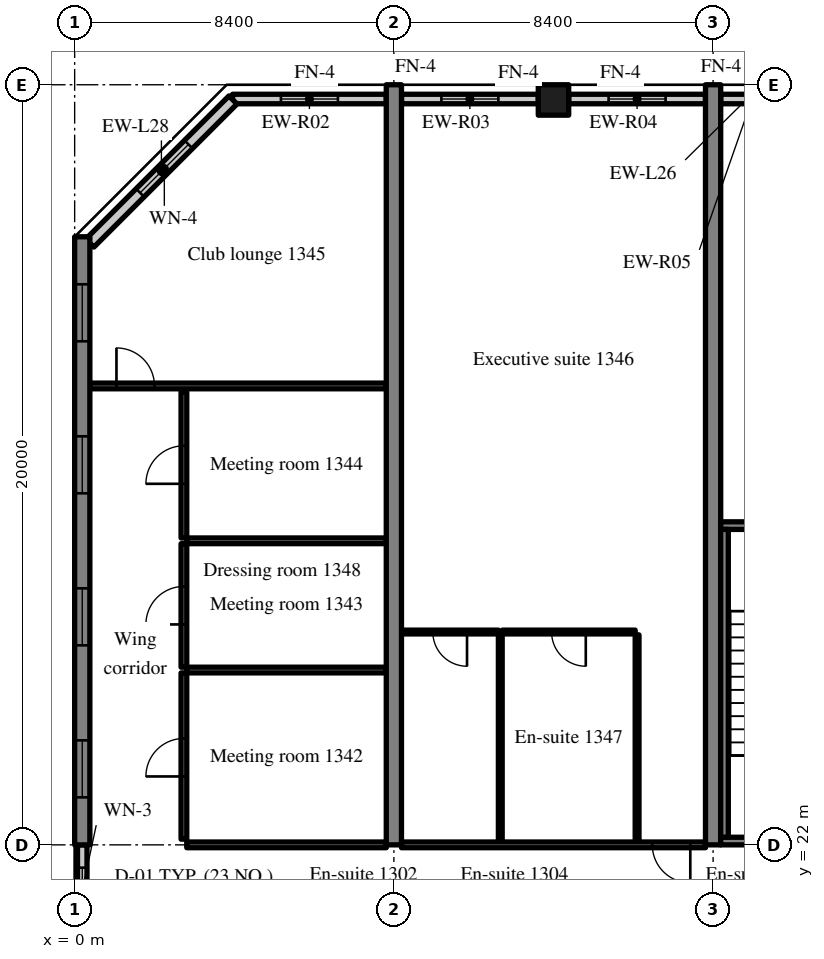
"""IFC4 building model, lengths in metres.
Left out: names, types, materials, properties, quantities, classifications, styles, units other than length and angle.
Written with IfcOpenShell. Run it as: python <this file> out.ifc"""

import sys

from ifc_helpers import new_model, si_unit, direction, frame, frame_2d, origin, origin_2d, place, context, subcontext, project, spatial, rectangle, extrude, source, transform, mapped, element, fill, save


model = new_model("IFC4")
c1 = context("Model", 3, precision=1e-05, world=origin(), true_north=direction((0.0, 1.0)))
c2 = subcontext(c1, "Body", "Model", "MODEL_VIEW")
j1 = project(units=[si_unit("LENGTHUNIT", "METRE"), si_unit("PLANEANGLEUNIT", "RADIAN")], contexts=[c1])
p1 = place(None, origin())
s1 = spatial("IfcSite", under=j1, at=p1, CompositionType="ELEMENT")
p2 = place(p1, origin())
s2 = spatial("IfcBuilding", under=s1, at=p2, CompositionType="ELEMENT")
p3 = place(p2, frame((0.0, 0.0, 58.2)))
s3 = spatial("IfcBuildingStorey", under=s2, at=p3, CompositionType="ELEMENT", Elevation=58.2)
m1 = source(origin(), c2, "Body", "SweptSolid", [
    extrude(rectangle(XDim=16.0, YDim=0.4, at=frame_2d((8.0, 0.0))), origin(), (0.0, 0.0, 1.0), 3.52),
])
p4 = place(p3, frame((0.2, 22.0, 0.0), z_axis=(0.0, 0.0, 1.0), x_axis=(0.0, 1.0, 0.0)))
e1 = element("IfcWall", 1, at=p4, inside=s3, PredefinedType="SHEAR", context=c2, shape_type="MappedRepresentation", body=[
    mapped(m1, transform((0.0, 0.0, 0.0), scale=1.0)),
])
m2 = source(origin(), c2, "Body", "SweptSolid", [
    extrude(rectangle(XDim=1.5, YDim=1.5, at=frame_2d((0.75, 0.75))), frame((0.0, 0.21, 0.0), z_axis=(0.0, -1.0, 0.0), x_axis=(1.0, 0.0, 0.0)), (0.0, 0.0, 1.0), 0.42),
])
p5 = place(p4, frame((1.25, 0.0, 0.9)))
e2 = element("IfcOpeningElement", 2, at=p5, cuts=e1, PredefinedType="OPENING", context=c2, shape_type="MappedRepresentation", body=[
    mapped(m2, transform((0.0, 0.0, 0.0), scale=1.0)),
])
p6 = place(p4, frame((5.25, 0.0, 0.9)))
e3 = element("IfcOpeningElement", 3, at=p6, cuts=e1, PredefinedType="OPENING", context=c2, shape_type="MappedRepresentation", body=[
    mapped(m2, transform((0.0, 0.0, 0.0), scale=1.0)),
])
p7 = place(p4, frame((9.25, 0.0, 0.9)))
e4 = element("IfcOpeningElement", 4, at=p7, cuts=e1, PredefinedType="OPENING", context=c2, shape_type="MappedRepresentation", body=[
    mapped(m2, transform((0.0, 0.0, 0.0), scale=1.0)),
])
p8 = place(p4, frame((13.25, 0.0, 0.9)))
e5 = element("IfcOpeningElement", 5, at=p8, cuts=e1, PredefinedType="OPENING", context=c2, shape_type="MappedRepresentation", body=[
    mapped(m2, transform((0.0, 0.0, 0.0), scale=1.0)),
])
m3 = source(origin(), c2, "Body", "SweptSolid", [
    extrude(rectangle(XDim=20.0, YDim=0.4, at=frame_2d((10.0, 0.0))), origin(), (0.0, 0.0, 1.0), 3.52),
])
for number, where, z_axis, x_axis in (
    (6, (8.4, 22.0, 0.0), (0.0, 0.0, 1.0), (0.0, 1.0, 0.0)),
    (7, (16.8, 22.0, 0.0), (0.0, 0.0, 1.0), (0.0, 1.0, 0.0)),
):
    element("IfcWall", number, at=place(p3, frame(where, z_axis=z_axis, x_axis=x_axis)), inside=s3, PredefinedType="SHEAR", context=c2, shape_type="MappedRepresentation", body=[
        mapped(m3, transform((0.0, 0.0, 0.0), scale=1.0)),
    ])
m4 = source(origin(), c2, "Body", "SweptSolid", [
    extrude(rectangle(XDim=0.8, YDim=0.8, at=origin_2d()), origin(), (0.0, 0.0, 1.0), 3.52),
])
p9 = place(p3, frame((12.6, 41.6, 0.0), z_axis=(0.0, 0.0, 1.0), x_axis=(1.0, 0.0, 0.0)))
e8 = element("IfcColumn", 8, at=p9, inside=s3, PredefinedType="COLUMN", context=c2, shape_type="MappedRepresentation", body=[
    mapped(m4, transform((0.0, 0.0, 0.0), scale=1.0)),
])
m5 = source(origin(), c2, "Body", "SweptSolid", [
    extrude(rectangle(XDim=4.045, YDim=0.25, at=frame_2d((2.022, 0.0))), origin(), (0.0, 0.0, 1.0), 2.82),
])
p10 = place(p3, frame((8.2, 41.625, 0.0), z_axis=(0.0, 0.0, 1.0), x_axis=(-1.0, 0.0, 0.0)))
e9 = element("IfcWall", 9, at=p10, inside=s3, PredefinedType="SOLIDWALL", context=c2, shape_type="MappedRepresentation", body=[
    mapped(m5, transform((0.0, 0.0, 0.0), scale=1.0)),
])
m6 = source(origin(), c2, "Body", "SweptSolid", [
    extrude(rectangle(XDim=1.5, YDim=1.5, at=frame_2d((0.75, 0.75))), frame((0.0, 0.135, 0.0), z_axis=(0.0, -1.0, 0.0), x_axis=(1.0, 0.0, 0.0)), (0.0, 0.0, 1.0), 0.27),
])
p11 = place(p10, frame((1.272, 0.0, 0.9)))
e10 = element("IfcOpeningElement", 10, at=p11, cuts=e9, PredefinedType="OPENING", context=c2, shape_type="MappedRepresentation", body=[
    mapped(m6, transform((0.0, 0.0, 0.0), scale=1.0)),
])
m7 = source(origin(), c2, "Body", "SweptSolid", [
    extrude(rectangle(XDim=3.6, YDim=0.25, at=frame_2d((1.8, 0.0))), origin(), (0.0, 0.0, 1.0), 2.82),
])
p12 = place(p3, frame((12.2, 41.625, 0.0), z_axis=(0.0, 0.0, 1.0), x_axis=(-1.0, 0.0, 0.0)))
e11 = element("IfcWall", 11, at=p12, inside=s3, PredefinedType="SOLIDWALL", context=c2, shape_type="MappedRepresentation", body=[
    mapped(m7, transform((0.0, 0.0, 0.0), scale=1.0)),
])
p13 = place(p12, frame((1.05, 0.0, 0.9)))
e12 = element("IfcOpeningElement", 12, at=p13, cuts=e11, PredefinedType="OPENING", context=c2, shape_type="MappedRepresentation", body=[
    mapped(m6, transform((0.0, 0.0, 0.0), scale=1.0)),
])
m8 = source(origin(), c2, "Body", "SweptSolid", [
    extrude(rectangle(XDim=3.6, YDim=0.25, at=frame_2d((1.8, 0.0))), origin(), (0.0, 0.0, 1.0), 2.82),
])
p14 = place(p3, frame((16.6, 41.625, 0.0), z_axis=(0.0, 0.0, 1.0), x_axis=(-1.0, 0.0, 0.0)))
e13 = element("IfcWall", 13, at=p14, inside=s3, PredefinedType="SOLIDWALL", context=c2, shape_type="MappedRepresentation", body=[
    mapped(m8, transform((0.0, 0.0, 0.0), scale=1.0)),
])
p15 = place(p14, frame((1.05, 0.0, 0.9)))
e14 = element("IfcOpeningElement", 14, at=p15, cuts=e13, PredefinedType="OPENING", context=c2, shape_type="MappedRepresentation", body=[
    mapped(m6, transform((0.0, 0.0, 0.0), scale=1.0)),
])
m9 = source(origin(), c2, "Body", "SweptSolid", [
    extrude(rectangle(XDim=1.658, YDim=0.25, at=frame_2d((0.829, 0.0))), origin(), (0.0, 0.0, 1.0), 2.82),
])
p16 = place(p3, frame((18.658, 41.625, 0.0), z_axis=(0.0, 0.0, 1.0), x_axis=(-1.0, 0.0, 0.0)))
e15 = element("IfcWall", 15, at=p16, inside=s3, PredefinedType="SOLIDWALL", context=c2, shape_type="MappedRepresentation", body=[
    mapped(m9, transform((0.0, 0.0, 0.0), scale=1.0)),
])
m10 = source(origin(), c2, "Body", "SweptSolid", [
    extrude(rectangle(XDim=5.326, YDim=0.3, at=frame_2d((2.663, 0.0))), origin(), (0.0, 0.0, 1.0), 3.52),
])
p17 = place(p3, frame((4.166, 41.6, 0.0), z_axis=(0.0, 0.0, 1.0), x_axis=(-0.707106781187, -0.707106781187, 0.0)))
e16 = element("IfcWall", 16, at=p17, inside=s3, PredefinedType="SOLIDWALL", context=c2, shape_type="MappedRepresentation", body=[
    mapped(m10, transform((0.0, 0.0, 0.0), scale=1.0)),
])
m11 = source(origin(), c2, "Body", "SweptSolid", [
    extrude(rectangle(XDim=1.8, YDim=1.5, at=frame_2d((0.9, 0.75))), frame((0.0, 0.16, 0.0), z_axis=(0.0, -1.0, 0.0), x_axis=(1.0, 0.0, 0.0)), (0.0, 0.0, 1.0), 0.32),
])
p18 = place(p17, frame((1.654, 0.0, 0.9)))
e17 = element("IfcOpeningElement", 17, at=p18, cuts=e16, PredefinedType="OPENING", context=c2, shape_type="MappedRepresentation", body=[
    mapped(m11, transform((0.0, 0.0, 0.0), scale=1.0)),
])
m12 = source(origin(), c2, "Body", "SweptSolid", [
    extrude(rectangle(XDim=2.4, YDim=0.25, at=frame_2d((1.2, 0.0))), origin(), (0.0, 0.0, 1.0), 2.62),
])
p19 = place(p3, frame((0.2, 19.6, 0.0), z_axis=(0.0, 0.0, 1.0), x_axis=(0.0, 1.0, 0.0)))
e18 = element("IfcWall", 18, at=p19, inside=s3, PredefinedType="SOLIDWALL", context=c2, shape_type="MappedRepresentation", body=[
    mapped(m12, transform((0.0, 0.0, 0.0), scale=1.0)),
])
m13 = source(origin(), c2, "Body", "SweptSolid", [
    extrude(rectangle(XDim=1.2, YDim=1.5, at=frame_2d((0.6, 0.75))), frame((0.0, 0.135, 0.0), z_axis=(0.0, -1.0, 0.0), x_axis=(1.0, 0.0, 0.0)), (0.0, 0.0, 1.0), 0.27),
])
p20 = place(p19, frame((0.6, 0.0, 0.9)))
e19 = element("IfcOpeningElement", 19, at=p20, cuts=e18, PredefinedType="OPENING", context=c2, shape_type="MappedRepresentation", body=[
    mapped(m13, transform((0.0, 0.0, 0.0), scale=1.0)),
])
m14 = source(origin(), c2, "Body", "SweptSolid", [
    extrude(rectangle(XDim=8.2, YDim=0.2, at=frame_2d((4.1, 0.0))), origin(), (0.0, 0.0, 1.0), 3.52),
])
p21 = place(p3, frame((17.0, 22.1, 0.0), z_axis=(0.0, 0.0, 1.0), x_axis=(1.0, 0.0, 0.0)))
e20 = element("IfcWall", 20, at=p21, inside=s3, PredefinedType="SOLIDWALL", context=c2, shape_type="MappedRepresentation", body=[
    mapped(m14, transform((0.0, 0.0, 0.0), scale=1.0)),
])
m15 = source(origin(), c2, "Body", "SweptSolid", [
    extrude(rectangle(XDim=1.2, YDim=2.1, at=frame_2d((0.6, 1.05))), frame((0.0, 0.11, 0.0), z_axis=(0.0, -1.0, 0.0), x_axis=(1.0, 0.0, 0.0)), (0.0, 0.0, 1.0), 0.22),
])
p22 = place(p21, frame((6.0, 0.0, 0.0)))
e21 = element("IfcOpeningElement", 21, at=p22, cuts=e20, PredefinedType="OPENING", context=c2, shape_type="MappedRepresentation", body=[
    mapped(m15, transform((0.0, 0.0, 0.0), scale=1.0)),
])
p23 = place(p3, frame((17.0, 30.4, 0.0), z_axis=(0.0, 0.0, 1.0), x_axis=(1.0, 0.0, 0.0)))
e22 = element("IfcWall", 22, at=p23, inside=s3, PredefinedType="SOLIDWALL", context=c2, shape_type="MappedRepresentation", body=[
    mapped(m14, transform((0.0, 0.0, 0.0), scale=1.0)),
])
m16 = source(origin(), c2, "Body", "SweptSolid", [
    extrude(rectangle(XDim=1.0, YDim=2.1, at=frame_2d((0.5, 1.05))), frame((0.0, 0.11, 0.0), z_axis=(0.0, -1.0, 0.0), x_axis=(1.0, 0.0, 0.0)), (0.0, 0.0, 1.0), 0.22),
])
p24 = place(p23, frame((6.1, 0.0, 0.0)))
e23 = element("IfcOpeningElement", 23, at=p24, cuts=e22, PredefinedType="OPENING", context=c2, shape_type="MappedRepresentation", body=[
    mapped(m16, transform((0.0, 0.0, 0.0), scale=1.0)),
])
m17 = source(origin(), c2, "Body", "SweptSolid", [
    extrude(rectangle(XDim=8.1, YDim=0.2, at=frame_2d((4.05, 0.0))), origin(), (0.0, 0.0, 1.0), 3.52),
])
p25 = place(p3, frame((17.1, 22.2, 0.0), z_axis=(0.0, 0.0, 1.0), x_axis=(0.0, 1.0, 0.0)))
e24 = element("IfcWall", 24, at=p25, inside=s3, PredefinedType="SOLIDWALL", context=c2, shape_type="MappedRepresentation", body=[
    mapped(m17, transform((0.0, 0.0, 0.0), scale=1.0)),
])
m18 = source(origin(), c2, "Body", "SweptSolid", [
    extrude(rectangle(XDim=5.25, YDim=0.15, at=frame_2d((2.625, 0.0))), origin(), (0.0, 0.0, 1.0), 2.82),
])
p26 = place(p3, frame((2.95, 22.0, 0.0), z_axis=(0.0, 0.0, 1.0), x_axis=(1.0, 0.0, 0.0)))
e25 = element("IfcWall", 25, at=p26, inside=s3, PredefinedType="PARTITIONING", context=c2, shape_type="MappedRepresentation", body=[
    mapped(m18, transform((0.0, 0.0, 0.0), scale=1.0)),
])
m19 = source(origin(), c2, "Body", "SweptSolid", [
    extrude(rectangle(XDim=4.375, YDim=0.15, at=frame_2d((2.188, 0.0))), origin(), (0.0, 0.0, 1.0), 3.52),
])
p27 = place(p3, frame((2.875, 22.15, 0.0), z_axis=(0.0, 0.0, 1.0), x_axis=(0.0, 1.0, 0.0)))
e26 = element("IfcWall", 26, at=p27, inside=s3, PredefinedType="PARTITIONING", context=c2, shape_type="MappedRepresentation", body=[
    mapped(m19, transform((0.0, 0.0, 0.0), scale=1.0)),
])
m20 = source(origin(), c2, "Body", "SweptSolid", [
    extrude(rectangle(XDim=1.0, YDim=2.1, at=frame_2d((0.5, 1.05))), frame((0.0, 0.085, 0.0), z_axis=(0.0, -1.0, 0.0), x_axis=(1.0, 0.0, 0.0)), (0.0, 0.0, 1.0), 0.17),
])
p28 = place(p27, frame((1.65, 0.0, 0.0)))
e27 = element("IfcOpeningElement", 27, at=p28, cuts=e26, PredefinedType="OPENING", context=c2, shape_type="MappedRepresentation", body=[
    mapped(m20, transform((0.0, 0.0, 0.0), scale=1.0)),
])
m21 = source(origin(), c2, "Body", "SweptSolid", [
    extrude(rectangle(XDim=5.25, YDim=0.15, at=frame_2d((2.625, 0.0))), origin(), (0.0, 0.0, 1.0), 3.52),
])
p29 = place(p3, frame((2.95, 26.6, 0.0), z_axis=(0.0, 0.0, 1.0), x_axis=(1.0, 0.0, 0.0)))
e28 = element("IfcWall", 28, at=p29, inside=s3, PredefinedType="PARTITIONING", context=c2, shape_type="MappedRepresentation", body=[
    mapped(m21, transform((0.0, 0.0, 0.0), scale=1.0)),
])
m22 = source(origin(), c2, "Body", "SweptSolid", [
    extrude(rectangle(XDim=3.25, YDim=0.15, at=frame_2d((1.625, 0.0))), origin(), (0.0, 0.0, 1.0), 3.52),
])
p30 = place(p3, frame((2.875, 26.675, 0.0), z_axis=(0.0, 0.0, 1.0), x_axis=(0.0, 1.0, 0.0)))
e29 = element("IfcWall", 29, at=p30, inside=s3, PredefinedType="PARTITIONING", context=c2, shape_type="MappedRepresentation", body=[
    mapped(m22, transform((0.0, 0.0, 0.0), scale=1.0)),
])
p31 = place(p30, frame((1.125, 0.0, 0.0)))
e30 = element("IfcOpeningElement", 30, at=p31, cuts=e29, PredefinedType="OPENING", context=c2, shape_type="MappedRepresentation", body=[
    mapped(m20, transform((0.0, 0.0, 0.0), scale=1.0)),
])
p32 = place(p3, frame((2.95, 30.0, 0.0), z_axis=(0.0, 0.0, 1.0), x_axis=(1.0, 0.0, 0.0)))
e31 = element("IfcWall", 31, at=p32, inside=s3, PredefinedType="PARTITIONING", context=c2, shape_type="MappedRepresentation", body=[
    mapped(m21, transform((0.0, 0.0, 0.0), scale=1.0)),
])
m23 = source(origin(), c2, "Body", "SweptSolid", [
    extrude(rectangle(XDim=3.85, YDim=0.15, at=frame_2d((1.925, 0.0))), origin(), (0.0, 0.0, 1.0), 3.52),
])
p33 = place(p3, frame((2.875, 30.075, 0.0), z_axis=(0.0, 0.0, 1.0), x_axis=(0.0, 1.0, 0.0)))
e32 = element("IfcWall", 32, at=p33, inside=s3, PredefinedType="PARTITIONING", context=c2, shape_type="MappedRepresentation", body=[
    mapped(m23, transform((0.0, 0.0, 0.0), scale=1.0)),
])
p34 = place(p33, frame((1.425, 0.0, 0.0)))
e33 = element("IfcOpeningElement", 33, at=p34, cuts=e32, PredefinedType="OPENING", context=c2, shape_type="MappedRepresentation", body=[
    mapped(m20, transform((0.0, 0.0, 0.0), scale=1.0)),
])
m24 = source(origin(), c2, "Body", "SweptSolid", [
    extrude(rectangle(XDim=7.8, YDim=0.15, at=frame_2d((3.9, 0.0))), origin(), (0.0, 0.0, 1.0), 3.52),
])
p35 = place(p3, frame((0.4, 34.075, 0.0), z_axis=(0.0, 0.0, 1.0), x_axis=(1.0, 0.0, 0.0)))
e34 = element("IfcWall", 34, at=p35, inside=s3, PredefinedType="PARTITIONING", context=c2, shape_type="MappedRepresentation", body=[
    mapped(m24, transform((0.0, 0.0, 0.0), scale=1.0)),
])
p36 = place(p35, frame((0.7, 0.0, 0.0)))
e35 = element("IfcOpeningElement", 35, at=p36, cuts=e34, PredefinedType="OPENING", context=c2, shape_type="MappedRepresentation", body=[
    mapped(m20, transform((0.0, 0.0, 0.0), scale=1.0)),
])
m25 = source(origin(), c2, "Body", "SweptSolid", [
    extrude(rectangle(XDim=5.45, YDim=0.1, at=frame_2d((2.725, 0.0))), origin(), (0.0, 0.0, 1.0), 3.52),
])
for number, where, z_axis, x_axis in (
    (36, (14.8, 22.075, 0.0), (0.0, 0.0, 1.0), (0.0, 1.0, 0.0)),
    (37, (11.2, 22.075, 0.0), (0.0, 0.0, 1.0), (0.0, 1.0, 0.0)),
):
    element("IfcWall", number, at=place(p3, frame(where, z_axis=z_axis, x_axis=x_axis)), inside=s3, PredefinedType="PARTITIONING", context=c2, shape_type="MappedRepresentation", body=[
        mapped(m25, transform((0.0, 0.0, 0.0), scale=1.0)),
    ])
m26 = source(origin(), c2, "Body", "SweptSolid", [
    extrude(rectangle(XDim=3.5, YDim=0.1, at=frame_2d((1.75, 0.0))), origin(), (0.0, 0.0, 1.0), 3.52),
])
p37 = place(p3, frame((11.25, 27.6, 0.0), z_axis=(0.0, 0.0, 1.0), x_axis=(1.0, 0.0, 0.0)))
e38 = element("IfcWall", 38, at=p37, inside=s3, PredefinedType="PARTITIONING", context=c2, shape_type="MappedRepresentation", body=[
    mapped(m26, transform((0.0, 0.0, 0.0), scale=1.0)),
])
m27 = source(origin(), c2, "Body", "SweptSolid", [
    extrude(rectangle(XDim=0.9, YDim=2.1, at=frame_2d((0.45, 1.05))), frame((0.0, 0.06, 0.0), z_axis=(0.0, -1.0, 0.0), x_axis=(1.0, 0.0, 0.0)), (0.0, 0.0, 1.0), 0.12),
])
p38 = place(p37, frame((1.3, 0.0, 0.0)))
e39 = element("IfcOpeningElement", 39, at=p38, cuts=e38, PredefinedType="OPENING", context=c2, shape_type="MappedRepresentation", body=[
    mapped(m27, transform((0.0, 0.0, 0.0), scale=1.0)),
])
m28 = source(origin(), c2, "Body", "SweptSolid", [
    extrude(rectangle(XDim=2.55, YDim=0.1, at=frame_2d((1.275, 0.0))), origin(), (0.0, 0.0, 1.0), 3.52),
])
p39 = place(p3, frame((8.6, 27.6, 0.0), z_axis=(0.0, 0.0, 1.0), x_axis=(1.0, 0.0, 0.0)))
e40 = element("IfcWall", 40, at=p39, inside=s3, PredefinedType="PARTITIONING", context=c2, shape_type="MappedRepresentation", body=[
    mapped(m28, transform((0.0, 0.0, 0.0), scale=1.0)),
])
p40 = place(p39, frame((0.825, 0.0, 0.0)))
e41 = element("IfcOpeningElement", 41, at=p40, cuts=e40, PredefinedType="OPENING", context=c2, shape_type="MappedRepresentation", body=[
    mapped(m27, transform((0.0, 0.0, 0.0), scale=1.0)),
])
m29 = source(origin(), c2, "Body", "SweptSolid", [
    extrude(rectangle(XDim=8.0, YDim=0.15, at=frame_2d((4.0, 0.0))), origin(), (0.0, 0.0, 1.0), 2.82),
])
p41 = place(p3, frame((8.6, 22.0, 0.0), z_axis=(0.0, 0.0, 1.0), x_axis=(1.0, 0.0, 0.0)))
e42 = element("IfcWall", 42, at=p41, inside=s3, PredefinedType="PARTITIONING", context=c2, shape_type="MappedRepresentation", body=[
    mapped(m29, transform((0.0, 0.0, 0.0), scale=1.0)),
])
p42 = place(p41, frame((6.6, 0.0, 0.0)))
e43 = element("IfcOpeningElement", 43, at=p42, cuts=e42, PredefinedType="OPENING", context=c2, shape_type="MappedRepresentation", body=[
    mapped(m20, transform((0.0, 0.0, 0.0), scale=1.0)),
])
m30 = source(origin(), c2, "Body", "SweptSolid", [
    extrude(rectangle(XDim=1.5, YDim=1.5, at=frame_2d((0.75, 0.75))), frame((0.0, 0.03, 0.0), z_axis=(0.0, -1.0, 0.0), x_axis=(1.0, 0.0, 0.0)), (0.0, 0.0, 1.0), 0.06),
])
p43 = place(p11, origin())
e44 = element("IfcWindow", 44, at=p43, inside=s3, PartitioningType="SINGLE_PANEL", PredefinedType="WINDOW", context=c2, shape_type="MappedRepresentation", body=[
    mapped(m30, transform((0.0, 0.0, 0.0), scale=1.0)),
])
fill(e10, e44)
p44 = place(p13, origin())
e45 = element("IfcWindow", 45, at=p44, inside=s3, PartitioningType="SINGLE_PANEL", PredefinedType="WINDOW", context=c2, shape_type="MappedRepresentation", body=[
    mapped(m30, transform((0.0, 0.0, 0.0), scale=1.0)),
])
fill(e12, e45)
p45 = place(p15, origin())
e46 = element("IfcWindow", 46, at=p45, inside=s3, PartitioningType="SINGLE_PANEL", PredefinedType="WINDOW", context=c2, shape_type="MappedRepresentation", body=[
    mapped(m30, transform((0.0, 0.0, 0.0), scale=1.0)),
])
fill(e14, e46)
m31 = source(origin(), c2, "Body", "SweptSolid", [
    extrude(rectangle(XDim=1.8, YDim=1.5, at=frame_2d((0.9, 0.75))), frame((0.0, 0.03, 0.0), z_axis=(0.0, -1.0, 0.0), x_axis=(1.0, 0.0, 0.0)), (0.0, 0.0, 1.0), 0.06),
])
p46 = place(p18, origin())
e47 = element("IfcWindow", 47, at=p46, inside=s3, PartitioningType="SINGLE_PANEL", PredefinedType="WINDOW", context=c2, shape_type="MappedRepresentation", body=[
    mapped(m31, transform((0.0, 0.0, 0.0), scale=1.0)),
])
fill(e17, e47)
p47 = place(p5, origin())
e48 = element("IfcWindow", 48, at=p47, inside=s3, PartitioningType="SINGLE_PANEL", PredefinedType="WINDOW", context=c2, shape_type="MappedRepresentation", body=[
    mapped(m30, transform((0.0, 0.0, 0.0), scale=1.0)),
])
fill(e2, e48)
p48 = place(p6, origin())
e49 = element("IfcWindow", 49, at=p48, inside=s3, PartitioningType="SINGLE_PANEL", PredefinedType="WINDOW", context=c2, shape_type="MappedRepresentation", body=[
    mapped(m30, transform((0.0, 0.0, 0.0), scale=1.0)),
])
fill(e3, e49)
p49 = place(p7, origin())
e50 = element("IfcWindow", 50, at=p49, inside=s3, PartitioningType="SINGLE_PANEL", PredefinedType="WINDOW", context=c2, shape_type="MappedRepresentation", body=[
    mapped(m30, transform((0.0, 0.0, 0.0), scale=1.0)),
])
fill(e4, e50)
p50 = place(p8, origin())
e51 = element("IfcWindow", 51, at=p50, inside=s3, PartitioningType="SINGLE_PANEL", PredefinedType="WINDOW", context=c2, shape_type="MappedRepresentation", body=[
    mapped(m30, transform((0.0, 0.0, 0.0), scale=1.0)),
])
fill(e5, e51)
m32 = source(origin(), c2, "Body", "SweptSolid", [
    extrude(rectangle(XDim=1.2, YDim=1.5, at=frame_2d((0.6, 0.75))), frame((0.0, 0.03, 0.0), z_axis=(0.0, -1.0, 0.0), x_axis=(1.0, 0.0, 0.0)), (0.0, 0.0, 1.0), 0.06),
])
p51 = place(p20, origin())
e52 = element("IfcWindow", 52, at=p51, inside=s3, PartitioningType="SINGLE_PANEL", PredefinedType="WINDOW", context=c2, shape_type="MappedRepresentation", body=[
    mapped(m32, transform((0.0, 0.0, 0.0), scale=1.0)),
])
fill(e19, e52)
m33 = source(origin(), c2, "Body", "SweptSolid", [
    extrude(rectangle(XDim=1.0, YDim=2.1, at=frame_2d((0.5, 1.05))), frame((0.0, 0.025, 0.0), z_axis=(0.0, -1.0, 0.0), x_axis=(1.0, 0.0, 0.0)), (0.0, 0.0, 1.0), 0.05),
])
p52 = place(p28, origin())
e53 = element("IfcDoor", 53, at=p52, inside=s3, OperationType="SINGLE_SWING_LEFT", PredefinedType="DOOR", context=c2, shape_type="MappedRepresentation", body=[
    mapped(m33, transform((0.0, 0.0, 0.0), scale=1.0)),
])
fill(e27, e53)
p53 = place(p31, origin())
e54 = element("IfcDoor", 54, at=p53, inside=s3, OperationType="SINGLE_SWING_LEFT", PredefinedType="DOOR", context=c2, shape_type="MappedRepresentation", body=[
    mapped(m33, transform((0.0, 0.0, 0.0), scale=1.0)),
])
fill(e30, e54)
p54 = place(p34, origin())
e55 = element("IfcDoor", 55, at=p54, inside=s3, OperationType="SINGLE_SWING_LEFT", PredefinedType="DOOR", context=c2, shape_type="MappedRepresentation", body=[
    mapped(m33, transform((0.0, 0.0, 0.0), scale=1.0)),
])
fill(e33, e55)
p55 = place(p36, origin())
e56 = element("IfcDoor", 56, at=p55, inside=s3, OperationType="SINGLE_SWING_LEFT", PredefinedType="DOOR", context=c2, shape_type="MappedRepresentation", body=[
    mapped(m33, transform((0.0, 0.0, 0.0), scale=1.0)),
])
fill(e35, e56)
m34 = source(origin(), c2, "Body", "SweptSolid", [
    extrude(rectangle(XDim=0.9, YDim=2.1, at=frame_2d((0.45, 1.05))), frame((0.0, 0.025, 0.0), z_axis=(0.0, -1.0, 0.0), x_axis=(1.0, 0.0, 0.0)), (0.0, 0.0, 1.0), 0.05),
])
p56 = place(p38, origin())
e57 = element("IfcDoor", 57, at=p56, inside=s3, OperationType="SINGLE_SWING_RIGHT", PredefinedType="DOOR", context=c2, shape_type="MappedRepresentation", body=[
    mapped(m34, transform((0.0, 0.0, 0.0), scale=1.0)),
])
fill(e39, e57)
p57 = place(p40, origin())
e58 = element("IfcDoor", 58, at=p57, inside=s3, OperationType="SINGLE_SWING_RIGHT", PredefinedType="DOOR", context=c2, shape_type="MappedRepresentation", body=[
    mapped(m34, transform((0.0, 0.0, 0.0), scale=1.0)),
])
fill(e41, e58)
p58 = place(p42, origin())
e59 = element("IfcDoor", 59, at=p58, inside=s3, OperationType="SINGLE_SWING_RIGHT", PredefinedType="DOOR", context=c2, shape_type="MappedRepresentation", body=[
    mapped(m33, transform((0.0, 0.0, 0.0), scale=1.0)),
])
fill(e43, e59)
save(model, sys.argv[1])
